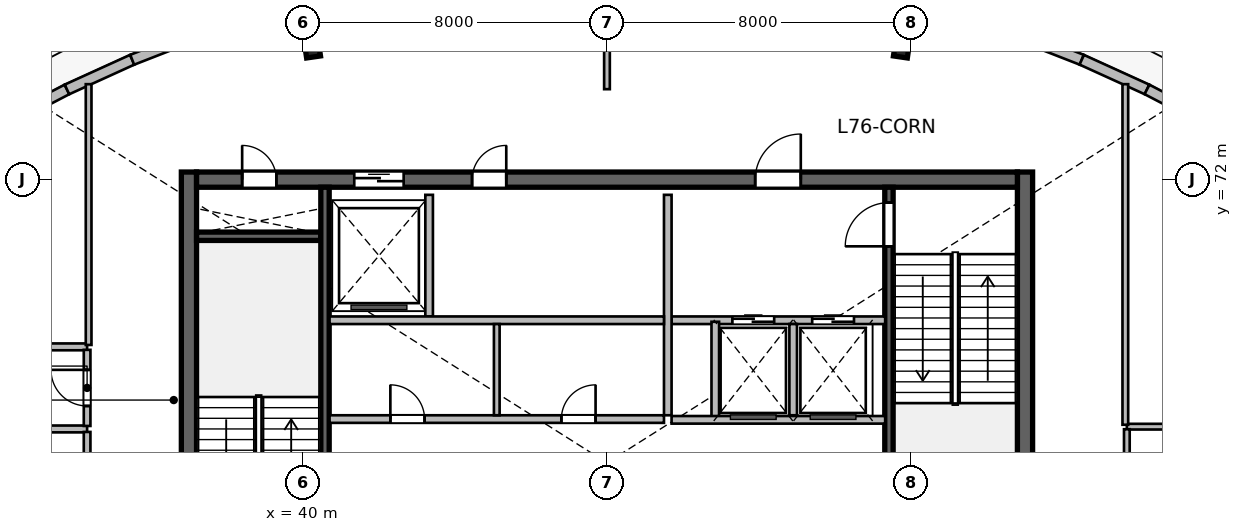
"""IFC4 building model, lengths in metres.
Left out: names, types, materials, properties, quantities, classifications, styles, units other than length and angle.
Written with IfcOpenShell. Run it as: python <this file> out.ifc"""

import sys

from ifc_helpers import new_model, si_unit, direction, frame, frame_2d, origin, origin_2d, place, context, subcontext, project, spatial, rectangle, i_section, extrude, source, transform, mapped, element, fill, save


model = new_model("IFC4")
c1 = context("Model", 3, precision=1e-05, world=origin(), true_north=direction((0.0, 1.0)))
c2 = subcontext(c1, "Body", "Model", "MODEL_VIEW")
j1 = project(units=[si_unit("LENGTHUNIT", "METRE"), si_unit("PLANEANGLEUNIT", "RADIAN")], contexts=[c1])
p1 = place(None, origin())
s1 = spatial("IfcSite", under=j1, at=p1, CompositionType="ELEMENT")
p2 = place(p1, origin())
s2 = spatial("IfcBuilding", under=s1, at=p2, CompositionType="ELEMENT")
p3 = place(p2, frame((0.0, 0.0, 312.6)))
s3 = spatial("IfcBuildingStorey", under=s2, at=p3, CompositionType="ELEMENT", Elevation=312.6)
m1 = source(origin(), c2, "Body", "SweptSolid", [
    extrude(rectangle(XDim=12.0, YDim=0.4, at=frame_2d((6.0, 0.0))), origin(), (0.0, 0.0, 1.0), 5.4),
])
for number, where, z_axis, x_axis in (
    (1, (37.0, 60.2, 0.0), (0.0, 0.0, 1.0), (0.0, 1.0, 0.0)),
    (2, (59.0, 60.2, 0.0), (0.0, 0.0, 1.0), (0.0, 1.0, 0.0)),
):
    element("IfcWall", number, at=place(p3, frame(where, z_axis=z_axis, x_axis=x_axis)), inside=s3, PredefinedType="SHEAR", context=c2, shape_type="MappedRepresentation", body=[
        mapped(m1, transform((0.0, 0.0, 0.0), scale=1.0)),
    ])
m2 = source(origin(), c2, "Body", "SweptSolid", [
    extrude(rectangle(XDim=21.6, YDim=0.4, at=frame_2d((10.8, 0.0))), origin(), (0.0, 0.0, 1.0), 5.4),
])
p4 = place(p3, frame((37.2, 72.0, 0.0), z_axis=(0.0, 0.0, 1.0), x_axis=(1.0, 0.0, 0.0)))
e3 = element("IfcWall", 3, at=p4, inside=s3, PredefinedType="SHEAR", context=c2, shape_type="MappedRepresentation", body=[
    mapped(m2, transform((0.0, 0.0, 0.0), scale=1.0)),
])
p5 = place(p4, frame((1.2, 0.0, 0.0)))
e4 = element("IfcOpeningElement", 4, at=p5, cuts=e3, PredefinedType="OPENING", context=c2, shape_type="SweptSolid", body=[
    extrude(rectangle(XDim=0.9, YDim=2.1, at=frame_2d((0.45, 1.05))), frame((0.0, 0.21, 0.0), z_axis=(0.0, -1.0, 0.0), x_axis=(1.0, 0.0, 0.0)), (0.0, 0.0, 1.0), 0.42),
])
p6 = place(p4, frame((14.7, 0.0, 0.0)))
e5 = element("IfcOpeningElement", 5, at=p6, cuts=e3, PredefinedType="OPENING", context=c2, shape_type="SweptSolid", body=[
    extrude(rectangle(XDim=1.2, YDim=2.15, at=frame_2d((0.6, 1.075))), frame((0.0, 0.21, 0.0), z_axis=(0.0, -1.0, 0.0), x_axis=(1.0, 0.0, 0.0)), (0.0, 0.0, 1.0), 0.42),
])
p7 = place(p4, frame((4.15, 0.0, 0.0)))
e6 = element("IfcOpeningElement", 6, at=p7, cuts=e3, PredefinedType="OPENING", context=c2, shape_type="SweptSolid", body=[
    extrude(rectangle(XDim=1.3, YDim=2.15, at=frame_2d((0.65, 1.075))), frame((0.0, 0.21, 0.0), z_axis=(0.0, -1.0, 0.0), x_axis=(1.0, 0.0, 0.0)), (0.0, 0.0, 1.0), 0.42),
])
p8 = place(p4, frame((7.25, 0.0, 0.0)))
e7 = element("IfcOpeningElement", 7, at=p8, cuts=e3, PredefinedType="OPENING", context=c2, shape_type="SweptSolid", body=[
    extrude(rectangle(XDim=0.9, YDim=2.1, at=frame_2d((0.45, 1.05))), frame((0.0, 0.21, 0.0), z_axis=(0.0, -1.0, 0.0), x_axis=(1.0, 0.0, 0.0)), (0.0, 0.0, 1.0), 0.42),
])
m3 = source(origin(), c2, "Body", "SweptSolid", [
    extrude(rectangle(XDim=3.27, YDim=0.22, at=frame_2d((1.635, 0.0))), origin(), (0.0, 0.0, 1.0), 5.4),
])
p9 = place(p3, frame((37.2, 70.51, 0.0), z_axis=(0.0, 0.0, 1.0), x_axis=(1.0, 0.0, 0.0)))
e8 = element("IfcWall", 8, at=p9, inside=s3, PredefinedType="SHEAR", context=c2, shape_type="MappedRepresentation", body=[
    mapped(m3, transform((0.0, 0.0, 0.0), scale=1.0)),
])
m4 = source(origin(), c2, "Body", "SweptSolid", [
    extrude(rectangle(XDim=11.2, YDim=0.22, at=frame_2d((5.6, 0.0))), origin(), (0.0, 0.0, 1.0), 5.4),
])
p10 = place(p3, frame((40.58, 60.6, 0.0), z_axis=(0.0, 0.0, 1.0), x_axis=(0.0, 1.0, 0.0)))
e9 = element("IfcWall", 9, at=p10, inside=s3, PredefinedType="SHEAR", context=c2, shape_type="MappedRepresentation", body=[
    mapped(m4, transform((0.0, 0.0, 0.0), scale=1.0)),
])
p11 = place(p3, frame((55.42, 60.6, 0.0), z_axis=(0.0, 0.0, 1.0), x_axis=(0.0, 1.0, 0.0)))
e10 = element("IfcWall", 10, at=p11, inside=s3, PredefinedType="SHEAR", context=c2, shape_type="MappedRepresentation", body=[
    mapped(m4, transform((0.0, 0.0, 0.0), scale=1.0)),
])
p12 = place(p11, frame((9.645, 0.0, 0.0)))
e11 = element("IfcOpeningElement", 11, at=p12, cuts=e10, PredefinedType="OPENING", context=c2, shape_type="SweptSolid", body=[
    extrude(rectangle(XDim=1.15, YDim=2.15, at=frame_2d((0.575, 1.075))), frame((0.0, 0.12, 0.0), z_axis=(0.0, -1.0, 0.0), x_axis=(1.0, 0.0, 0.0)), (0.0, 0.0, 1.0), 0.24),
])
m5 = source(origin(), c2, "Body", "SweptSolid", [
    extrude(i_section(OverallWidth=0.369, OverallDepth=0.356, WebThickness=0.011, FlangeThickness=0.018, at=origin_2d()), origin(), (0.0, 0.0, 1.0), 5.4),
])
for number, where, z_axis, x_axis in (
    (12, (40.253, 75.404, 0.0), (0.0, 0.0, 1.0), (-0.143, 0.99, 0.0)),
    (13, (55.747, 75.404, 0.0), (0.0, 0.0, 1.0), (0.143, 0.99, 0.0)),
):
    element("IfcColumn", number, at=place(p3, frame(where, z_axis=z_axis, x_axis=x_axis)), inside=s3, PredefinedType="COLUMN", context=c2, shape_type="MappedRepresentation", body=[
        mapped(m5, transform((0.0, 0.0, 0.0), scale=1.0)),
    ])
m6 = source(origin(), c2, "Body", "SweptSolid", [
    extrude(rectangle(XDim=1.906, YDim=0.28, at=frame_2d((0.953, 0.0))), origin(), (0.0, 0.0, 1.0), 5.12),
])
p13 = place(p3, frame((32.1, 73.493, 0.0), z_axis=(0.0, 0.0, 1.0), x_axis=(0.886820023543, 0.462114970373, 0.0)))
e14 = element("IfcWall", 14, at=p13, inside=s3, PredefinedType="SOLIDWALL", context=c2, shape_type="MappedRepresentation", body=[
    mapped(m6, transform((0.0, 0.0, 0.0), scale=1.0)),
])
m7 = source(origin(), c2, "Body", "SweptSolid", [
    extrude(rectangle(XDim=1.886, YDim=0.28, at=frame_2d((0.943, 0.0))), origin(), (0.0, 0.0, 1.0), 5.12),
])
p14 = place(p3, frame((33.79, 74.373, 0.0), z_axis=(0.0, 0.0, 1.0), x_axis=(0.910215678877, 0.414134540852, 0.0)))
e15 = element("IfcWall", 15, at=p14, inside=s3, PredefinedType="SOLIDWALL", context=c2, shape_type="MappedRepresentation", body=[
    mapped(m7, transform((0.0, 0.0, 0.0), scale=1.0)),
])
m8 = source(origin(), c2, "Body", "SweptSolid", [
    extrude(rectangle(XDim=1.869, YDim=0.28, at=frame_2d((0.934, 0.0))), origin(), (0.0, 0.0, 1.0), 5.12),
])
for number, where, z_axis, x_axis in (
    (16, (35.507, 75.154, 0.0), (0.0, 0.0, 1.0), (0.932, 0.364, 0.0)),
    (17, (58.753, 75.834, 0.0), (0.0, 0.0, 1.0), (0.932, -0.364, 0.0)),
):
    element("IfcWall", number, at=place(p3, frame(where, z_axis=z_axis, x_axis=x_axis)), inside=s3, PredefinedType="SOLIDWALL", context=c2, shape_type="MappedRepresentation", body=[
        mapped(m8, transform((0.0, 0.0, 0.0), scale=1.0)),
    ])
p15 = place(p3, frame((60.493, 75.154, 0.0), z_axis=(0.0, 0.0, 1.0), x_axis=(0.910215678877, -0.414134540852, 0.0)))
e18 = element("IfcWall", 18, at=p15, inside=s3, PredefinedType="SOLIDWALL", context=c2, shape_type="MappedRepresentation", body=[
    mapped(m7, transform((0.0, 0.0, 0.0), scale=1.0)),
])
p16 = place(p3, frame((62.21, 74.373, 0.0), z_axis=(0.0, 0.0, 1.0), x_axis=(0.886820023543, -0.462114970373, 0.0)))
e19 = element("IfcWall", 19, at=p16, inside=s3, PredefinedType="SOLIDWALL", context=c2, shape_type="MappedRepresentation", body=[
    mapped(m6, transform((0.0, 0.0, 0.0), scale=1.0)),
])
m9 = source(origin(), c2, "Body", "SweptSolid", [
    extrude(rectangle(XDim=5.62, YDim=0.2, at=frame_2d((2.81, 0.0))), origin(), (0.0, 0.0, 1.0), 5.12),
])
p17 = place(p3, frame((49.7, 68.3, 0.0), z_axis=(0.0, 0.0, 1.0), x_axis=(1.0, 0.0, 0.0)))
e20 = element("IfcWall", 20, at=p17, inside=s3, PredefinedType="SOLIDWALL", context=c2, shape_type="MappedRepresentation", body=[
    mapped(m9, transform((0.0, 0.0, 0.0), scale=1.0)),
])
p18 = place(p17, frame((1.6, 0.0, 0.0)))
e21 = element("IfcOpeningElement", 21, at=p18, cuts=e20, PredefinedType="OPENING", context=c2, shape_type="SweptSolid", body=[
    extrude(rectangle(XDim=1.1, YDim=2.15, at=frame_2d((0.55, 1.075))), frame((0.0, 0.11, 0.0), z_axis=(0.0, -1.0, 0.0), x_axis=(1.0, 0.0, 0.0)), (0.0, 0.0, 1.0), 0.22),
])
p19 = place(p17, frame((3.7, 0.0, 0.0)))
e22 = element("IfcOpeningElement", 22, at=p19, cuts=e20, PredefinedType="OPENING", context=c2, shape_type="SweptSolid", body=[
    extrude(rectangle(XDim=1.1, YDim=2.15, at=frame_2d((0.55, 1.075))), frame((0.0, 0.11, 0.0), z_axis=(0.0, -1.0, 0.0), x_axis=(1.0, 0.0, 0.0)), (0.0, 0.0, 1.0), 0.22),
])
m10 = source(origin(), c2, "Body", "SweptSolid", [
    extrude(rectangle(XDim=5.8, YDim=0.2, at=frame_2d((2.9, 0.0))), origin(), (0.0, 0.0, 1.0), 5.12),
])
p20 = place(p3, frame((49.6, 65.8, 0.0), z_axis=(0.0, 0.0, 1.0), x_axis=(0.0, 1.0, 0.0)))
e23 = element("IfcWall", 23, at=p20, inside=s3, PredefinedType="SOLIDWALL", context=c2, shape_type="MappedRepresentation", body=[
    mapped(m10, transform((0.0, 0.0, 0.0), scale=1.0)),
])
m11 = source(origin(), c2, "Body", "SweptSolid", [
    extrude(rectangle(XDim=2.58, YDim=0.2, at=frame_2d((1.29, 0.0))), origin(), (0.0, 0.0, 1.0), 5.12),
])
p21 = place(p3, frame((50.85, 65.68, 0.0), z_axis=(0.0, 0.0, 1.0), x_axis=(0.0, 1.0, 0.0)))
e24 = element("IfcWall", 24, at=p21, inside=s3, PredefinedType="SOLIDWALL", context=c2, shape_type="MappedRepresentation", body=[
    mapped(m11, transform((0.0, 0.0, 0.0), scale=1.0)),
])
m12 = source(origin(), c2, "Body", "SweptSolid", [
    extrude(rectangle(XDim=2.4, YDim=0.2, at=frame_2d((1.2, 0.0))), origin(), (0.0, 0.0, 1.0), 5.12),
])
p22 = place(p3, frame((52.9, 65.8, 0.0), z_axis=(0.0, 0.0, 1.0), x_axis=(0.0, 1.0, 0.0)))
e25 = element("IfcWall", 25, at=p22, inside=s3, PredefinedType="SOLIDWALL", context=c2, shape_type="MappedRepresentation", body=[
    mapped(m12, transform((0.0, 0.0, 0.0), scale=1.0)),
])
p23 = place(p3, frame((49.7, 65.68, 0.0), z_axis=(0.0, 0.0, 1.0), x_axis=(1.0, 0.0, 0.0)))
e26 = element("IfcWall", 26, at=p23, inside=s3, PredefinedType="SOLIDWALL", context=c2, shape_type="MappedRepresentation", body=[
    mapped(m9, transform((0.0, 0.0, 0.0), scale=1.0)),
])
m13 = source(origin(), c2, "Body", "SweptSolid", [
    extrude(rectangle(XDim=3.2, YDim=0.2, at=frame_2d((1.6, 0.0))), origin(), (0.0, 0.0, 1.0), 5.12),
])
p24 = place(p3, frame((43.32, 68.4, 0.0), z_axis=(0.0, 0.0, 1.0), x_axis=(0.0, 1.0, 0.0)))
e27 = element("IfcWall", 27, at=p24, inside=s3, PredefinedType="SOLIDWALL", context=c2, shape_type="MappedRepresentation", body=[
    mapped(m13, transform((0.0, 0.0, 0.0), scale=1.0)),
])
m14 = source(origin(), c2, "Body", "SweptSolid", [
    extrude(rectangle(XDim=8.8, YDim=0.2, at=frame_2d((4.4, 0.0))), origin(), (0.0, 0.0, 1.0), 5.12),
])
p25 = place(p3, frame((40.7, 68.3, 0.0), z_axis=(0.0, 0.0, 1.0), x_axis=(1.0, 0.0, 0.0)))
e28 = element("IfcWall", 28, at=p25, inside=s3, PredefinedType="SOLIDWALL", context=c2, shape_type="MappedRepresentation", body=[
    mapped(m14, transform((0.0, 0.0, 0.0), scale=1.0)),
])
p26 = place(p3, frame((40.7, 65.7, 0.0), z_axis=(0.0, 0.0, 1.0), x_axis=(1.0, 0.0, 0.0)))
e29 = element("IfcWall", 29, at=p26, inside=s3, PredefinedType="SOLIDWALL", context=c2, shape_type="MappedRepresentation", body=[
    mapped(m14, transform((0.0, 0.0, 0.0), scale=1.0)),
])
p27 = place(p26, frame((1.6, 0.0, 0.0)))
e30 = element("IfcOpeningElement", 30, at=p27, cuts=e29, PredefinedType="OPENING", context=c2, shape_type="SweptSolid", body=[
    extrude(rectangle(XDim=0.9, YDim=2.1, at=frame_2d((0.45, 1.05))), frame((0.0, 0.11, 0.0), z_axis=(0.0, -1.0, 0.0), x_axis=(1.0, 0.0, 0.0)), (0.0, 0.0, 1.0), 0.22),
])
p28 = place(p26, frame((6.1, 0.0, 0.0)))
e31 = element("IfcOpeningElement", 31, at=p28, cuts=e29, PredefinedType="OPENING", context=c2, shape_type="SweptSolid", body=[
    extrude(rectangle(XDim=0.9, YDim=2.1, at=frame_2d((0.45, 1.05))), frame((0.0, 0.11, 0.0), z_axis=(0.0, -1.0, 0.0), x_axis=(1.0, 0.0, 0.0)), (0.0, 0.0, 1.0), 0.22),
])
m15 = source(origin(), c2, "Body", "SweptSolid", [
    extrude(rectangle(XDim=2.4, YDim=0.15, at=frame_2d((1.2, 0.0))), origin(), (0.0, 0.0, 1.0), 5.12),
])
p29 = place(p3, frame((45.1, 65.8, 0.0), z_axis=(0.0, 0.0, 1.0), x_axis=(0.0, 1.0, 0.0)))
e32 = element("IfcWall", 32, at=p29, inside=s3, PredefinedType="PARTITIONING", context=c2, shape_type="MappedRepresentation", body=[
    mapped(m15, transform((0.0, 0.0, 0.0), scale=1.0)),
])
m16 = source(origin(), c2, "Body", "SweptSolid", [
    extrude(rectangle(XDim=3.52, YDim=0.18, at=frame_2d((1.76, 0.0))), origin(), (0.0, 0.0, 1.0), 5.12),
])
p30 = place(p3, frame((30.8, 65.44, 0.0), z_axis=(0.0, 0.0, 1.0), x_axis=(1.0, 0.0, 0.0)))
e33 = element("IfcWall", 33, at=p30, inside=s3, PredefinedType="PLUMBINGWALL", context=c2, shape_type="MappedRepresentation", body=[
    mapped(m16, transform((0.0, 0.0, 0.0), scale=1.0)),
])
m17 = source(origin(), c2, "Body", "SweptSolid", [
    extrude(rectangle(XDim=2.362, YDim=0.175, at=frame_2d((1.181, 0.0))), origin(), (0.0, 0.0, 1.0), 5.12),
])
p31 = place(p3, frame((34.32, 62.999, 0.0), z_axis=(0.0, 0.0, 1.0), x_axis=(0.0, 1.0, 0.0)))
e34 = element("IfcWall", 34, at=p31, inside=s3, PredefinedType="PARTITIONING", context=c2, shape_type="MappedRepresentation", body=[
    mapped(m17, transform((0.0, 0.0, 0.0), scale=1.0)),
])
p32 = place(p31, frame((0.731, 0.0, 0.0)))
e35 = element("IfcOpeningElement", 35, at=p32, cuts=e34, PredefinedType="OPENING", context=c2, shape_type="SweptSolid", body=[
    extrude(rectangle(XDim=0.9, YDim=2.08, at=frame_2d((0.45, 1.04))), frame((0.0, 0.098, 0.0), z_axis=(0.0, -1.0, 0.0), x_axis=(1.0, 0.0, 0.0)), (0.0, 0.0, 1.0), 0.195),
])
p33 = place(p3, frame((30.8, 67.6, 0.0), z_axis=(0.0, 0.0, 1.0), x_axis=(1.0, 0.0, 0.0)))
e36 = element("IfcWall", 36, at=p33, inside=s3, PredefinedType="PLUMBINGWALL", context=c2, shape_type="MappedRepresentation", body=[
    mapped(m16, transform((0.0, 0.0, 0.0), scale=1.0)),
])
m18 = source(origin(), c2, "Body", "SweptSolid", [
    extrude(rectangle(XDim=2.002, YDim=0.175, at=frame_2d((1.001, 0.0))), origin(), (0.0, 0.0, 1.0), 5.12),
])
p34 = place(p3, frame((34.32, 65.519, 0.0), z_axis=(0.0, 0.0, 1.0), x_axis=(0.0, 1.0, 0.0)))
e37 = element("IfcWall", 37, at=p34, inside=s3, PredefinedType="PARTITIONING", context=c2, shape_type="MappedRepresentation", body=[
    mapped(m18, transform((0.0, 0.0, 0.0), scale=1.0)),
])
p35 = place(p34, frame((0.526, 0.0, 0.0)))
e38 = element("IfcOpeningElement", 38, at=p35, cuts=e37, PredefinedType="OPENING", context=c2, shape_type="SweptSolid", body=[
    extrude(rectangle(XDim=0.95, YDim=2.12, at=frame_2d((0.475, 1.06))), frame((0.0, 0.098, 0.0), z_axis=(0.0, -1.0, 0.0), x_axis=(1.0, 0.0, 0.0)), (0.0, 0.0, 1.0), 0.195),
])
m19 = source(origin(), c2, "Body", "SweptSolid", [
    extrude(rectangle(XDim=3.92, YDim=0.15, at=frame_2d((1.96, 0.0))), origin(), (0.0, 0.0, 1.0), 5.12),
])
p36 = place(p3, frame((61.68, 65.5, 0.0), z_axis=(0.0, 0.0, 1.0), x_axis=(1.0, 0.0, 0.0)))
e39 = element("IfcWall", 39, at=p36, inside=s3, PredefinedType="PARTITIONING", context=c2, shape_type="MappedRepresentation", body=[
    mapped(m19, transform((0.0, 0.0, 0.0), scale=1.0)),
])
m20 = source(origin(), c2, "Body", "SweptSolid", [
    extrude(rectangle(XDim=4.865, YDim=0.15, at=frame_2d((2.433, 0.0))), origin(), (0.0, 0.0, 1.0), 5.12),
])
p37 = place(p3, frame((61.68, 60.567, 0.0), z_axis=(0.0, 0.0, 1.0), x_axis=(0.0, 1.0, 0.0)))
e40 = element("IfcWall", 40, at=p37, inside=s3, PredefinedType="PARTITIONING", context=c2, shape_type="MappedRepresentation", body=[
    mapped(m20, transform((0.0, 0.0, 0.0), scale=1.0)),
])
p38 = place(p37, frame((1.883, 0.0, 0.0)))
e41 = element("IfcOpeningElement", 41, at=p38, cuts=e40, PredefinedType="OPENING", context=c2, shape_type="SweptSolid", body=[
    extrude(rectangle(XDim=1.1, YDim=2.15, at=frame_2d((0.55, 1.075))), frame((0.0, 0.085, 0.0), z_axis=(0.0, -1.0, 0.0), x_axis=(1.0, 0.0, 0.0)), (0.0, 0.0, 1.0), 0.17),
])
m21 = source(origin(), c2, "Body", "SweptSolid", [
    extrude(rectangle(XDim=3.241, YDim=0.15, at=frame_2d((1.621, 0.0))), origin(), (0.0, 0.0, 1.0), 4.794),
])
p39 = place(p3, frame((48.0, 74.38, 0.0), z_axis=(0.0, 0.0, 1.0), x_axis=(0.0, 1.0, 0.0)))
e42 = element("IfcWall", 42, at=p39, inside=s3, PredefinedType="PARTITIONING", context=c2, shape_type="MappedRepresentation", body=[
    mapped(m21, transform((0.0, 0.0, 0.0), scale=1.0)),
])
m22 = source(origin(), c2, "Body", "SweptSolid", [
    extrude(rectangle(XDim=6.862, YDim=0.15, at=frame_2d((3.431, 0.0))), origin(), (0.0, 0.0, 1.0), 5.12),
])
p40 = place(p3, frame((34.36, 67.65, 0.0), z_axis=(0.0, 0.0, 1.0), x_axis=(0.0, 1.0, 0.0)))
e43 = element("IfcWall", 43, at=p40, inside=s3, PredefinedType="PARTITIONING", context=c2, shape_type="MappedRepresentation", body=[
    mapped(m22, transform((0.0, 0.0, 0.0), scale=1.0)),
])
m23 = source(origin(), c2, "Body", "SweptSolid", [
    extrude(rectangle(XDim=8.962, YDim=0.15, at=frame_2d((4.481, 0.0))), origin(), (0.0, 0.0, 1.0), 5.12),
])
p41 = place(p3, frame((61.64, 65.55, 0.0), z_axis=(0.0, 0.0, 1.0), x_axis=(0.0, 1.0, 0.0)))
e44 = element("IfcWall", 44, at=p41, inside=s3, PredefinedType="PARTITIONING", context=c2, shape_type="MappedRepresentation", body=[
    mapped(m23, transform((0.0, 0.0, 0.0), scale=1.0)),
])
m24 = source(origin(), c2, "Body", "SweptSolid", [
    extrude(rectangle(XDim=0.9, YDim=2.1, at=frame_2d((0.45, 1.05))), frame((0.0, 0.025, 0.0), z_axis=(0.0, -1.0, 0.0), x_axis=(1.0, 0.0, 0.0)), (0.0, 0.0, 1.0), 0.05),
])
p42 = place(p5, origin())
e45 = element("IfcDoor", 45, at=p42, inside=s3, OperationType="SINGLE_SWING_LEFT", PredefinedType="DOOR", context=c2, shape_type="MappedRepresentation", body=[
    mapped(m24, transform((0.0, 0.0, 0.0), scale=1.0)),
])
fill(e4, e45)
m25 = source(origin(), c2, "Body", "SweptSolid", [
    extrude(rectangle(XDim=1.15, YDim=2.15, at=frame_2d((0.575, 1.075))), frame((0.0, 0.025, 0.0), z_axis=(0.0, -1.0, 0.0), x_axis=(1.0, 0.0, 0.0)), (0.0, 0.0, 1.0), 0.05),
])
p43 = place(p12, origin())
e46 = element("IfcDoor", 46, at=p43, inside=s3, OperationType="SINGLE_SWING_LEFT", PredefinedType="DOOR", context=c2, shape_type="MappedRepresentation", body=[
    mapped(m25, transform((0.0, 0.0, 0.0), scale=1.0)),
])
fill(e11, e46)
m26 = source(origin(), c2, "Body", "SweptSolid", [
    extrude(rectangle(XDim=1.2, YDim=2.15, at=frame_2d((0.6, 1.075))), frame((0.0, 0.025, 0.0), z_axis=(0.0, -1.0, 0.0), x_axis=(1.0, 0.0, 0.0)), (0.0, 0.0, 1.0), 0.05),
])
p44 = place(p6, origin())
e47 = element("IfcDoor", 47, at=p44, inside=s3, OperationType="SINGLE_SWING_RIGHT", PredefinedType="DOOR", context=c2, shape_type="MappedRepresentation", body=[
    mapped(m26, transform((0.0, 0.0, 0.0), scale=1.0)),
])
fill(e5, e47)
m27 = source(origin(), c2, "Body", "SweptSolid", [
    extrude(rectangle(XDim=1.1, YDim=2.15, at=frame_2d((0.55, 1.075))), frame((0.0, 0.025, 0.0), z_axis=(0.0, -1.0, 0.0), x_axis=(1.0, 0.0, 0.0)), (0.0, 0.0, 1.0), 0.05),
])
p45 = place(p18, origin())
e48 = element("IfcDoor", 48, at=p45, inside=s3, OperationType="DOUBLE_DOOR_SLIDING", PredefinedType="DOOR", context=c2, shape_type="MappedRepresentation", body=[
    mapped(m27, transform((0.0, 0.0, 0.0), scale=1.0)),
])
fill(e21, e48)
p46 = place(p19, origin())
e49 = element("IfcDoor", 49, at=p46, inside=s3, OperationType="DOUBLE_DOOR_SLIDING", PredefinedType="DOOR", context=c2, shape_type="MappedRepresentation", body=[
    mapped(m27, transform((0.0, 0.0, 0.0), scale=1.0)),
])
fill(e22, e49)
m28 = source(origin(), c2, "Body", "SweptSolid", [
    extrude(rectangle(XDim=1.3, YDim=2.15, at=frame_2d((0.65, 1.075))), frame((0.0, 0.025, 0.0), z_axis=(0.0, -1.0, 0.0), x_axis=(1.0, 0.0, 0.0)), (0.0, 0.0, 1.0), 0.05),
])
p47 = place(p7, origin())
e50 = element("IfcDoor", 50, at=p47, inside=s3, OperationType="DOUBLE_DOOR_SLIDING", PredefinedType="DOOR", context=c2, shape_type="MappedRepresentation", body=[
    mapped(m28, transform((0.0, 0.0, 0.0), scale=1.0)),
])
fill(e6, e50)
p48 = place(p8, origin())
e51 = element("IfcDoor", 51, at=p48, inside=s3, OperationType="SINGLE_SWING_RIGHT", PredefinedType="DOOR", context=c2, shape_type="MappedRepresentation", body=[
    mapped(m24, transform((0.0, 0.0, 0.0), scale=1.0)),
])
fill(e7, e51)
p49 = place(p27, origin())
e52 = element("IfcDoor", 52, at=p49, inside=s3, OperationType="SINGLE_SWING_LEFT", PredefinedType="DOOR", context=c2, shape_type="MappedRepresentation", body=[
    mapped(m24, transform((0.0, 0.0, 0.0), scale=1.0)),
])
fill(e30, e52)
p50 = place(p28, origin())
e53 = element("IfcDoor", 53, at=p50, inside=s3, OperationType="SINGLE_SWING_RIGHT", PredefinedType="DOOR", context=c2, shape_type="MappedRepresentation", body=[
    mapped(m24, transform((0.0, 0.0, 0.0), scale=1.0)),
])
fill(e31, e53)
m29 = source(origin(), c2, "Body", "SweptSolid", [
    extrude(rectangle(XDim=0.95, YDim=2.12, at=frame_2d((0.475, 1.06))), frame((0.0, 0.025, 0.0), z_axis=(0.0, -1.0, 0.0), x_axis=(1.0, 0.0, 0.0)), (0.0, 0.0, 1.0), 0.05),
])
p51 = place(p35, origin())
e54 = element("IfcDoor", 54, at=p51, inside=s3, OperationType="SINGLE_SWING_RIGHT", PredefinedType="DOOR", context=c2, shape_type="MappedRepresentation", body=[
    mapped(m29, transform((0.0, 0.0, 0.0), scale=1.0)),
])
fill(e38, e54)
save(model, sys.argv[1])
